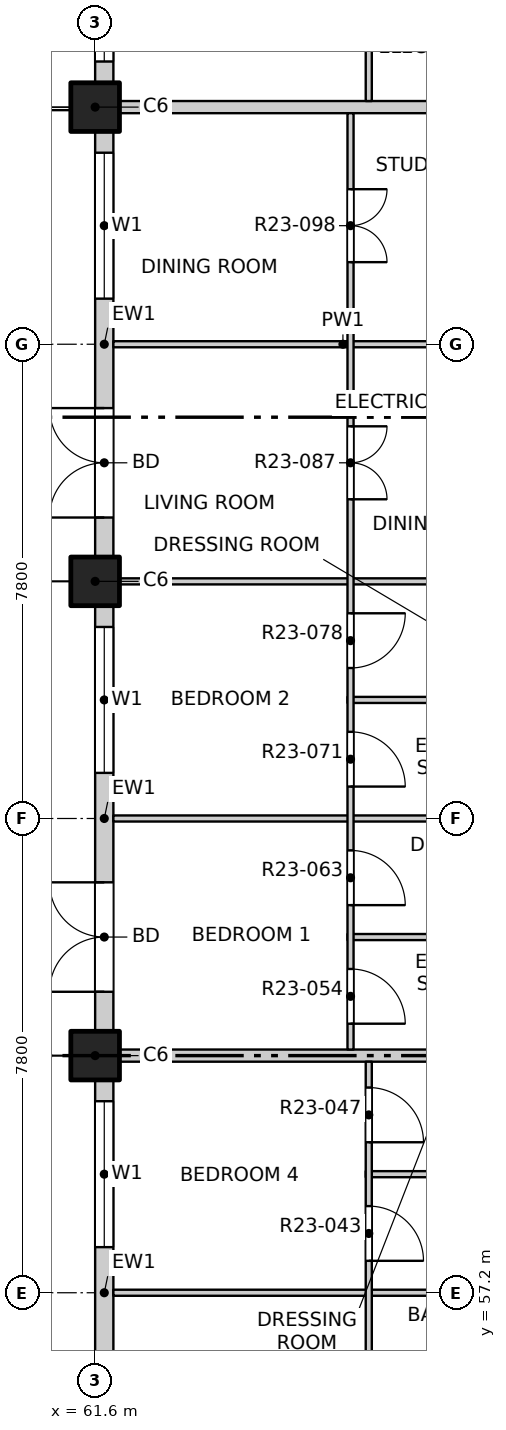
"""IFC4 building model, lengths in metres.
Left out: names, types, materials, properties, quantities, classifications, styles, units other than length and angle.
Written with IfcOpenShell. Run it as: python <this file> out.ifc"""

import sys

from ifc_helpers import new_model, si_unit, direction, frame, frame_2d, origin, origin_2d, place, context, subcontext, project, spatial, rectangle, extrude, element, fill, save


model = new_model("IFC4")
c1 = context("Model", 3, precision=1e-05, world=origin(), true_north=direction((0.0, 1.0)))
c2 = subcontext(c1, "Body", "Model", "MODEL_VIEW")
j1 = project(units=[si_unit("LENGTHUNIT", "METRE"), si_unit("PLANEANGLEUNIT", "RADIAN")], contexts=[c1])
p1 = place(None, origin())
s1 = spatial("IfcSite", under=j1, at=p1, CompositionType="ELEMENT")
p2 = place(p1, origin())
s2 = spatial("IfcBuilding", under=s1, at=p2, CompositionType="ELEMENT")
p3 = place(p2, frame((0.0, 0.0, 234.7)))
s3 = spatial("IfcBuildingStorey", under=s2, at=p3, CompositionType="ELEMENT", Elevation=234.7)
for number, where, z_axis, x_axis in (
    (1, (61.6, 61.1, -0.25), (0.0, 0.0, 1.0), (1.0, 0.0, 0.0)),
    (2, (61.6, 68.9, -0.25), (0.0, 0.0, 1.0), (1.0, 0.0, 0.0)),
    (3, (61.6, 76.7, -0.25), (0.0, 0.0, 1.0), (1.0, 0.0, 0.0)),
):
    element("IfcColumn", number, at=place(p3, frame(where, z_axis=z_axis, x_axis=x_axis)), inside=s3, PredefinedType="COLUMN", context=c2, shape_type="SweptSolid", body=[
        extrude(rectangle(XDim=0.8, YDim=0.8, at=origin_2d()), origin(), (0.0, 0.0, 1.0), 3.4),
    ])
p4 = place(p3, frame((61.75, 53.7, 0.0), z_axis=(0.0, 0.0, 1.0), x_axis=(0.0, 1.0, 0.0)))
e4 = element("IfcWall", 4, at=p4, inside=s3, PredefinedType="SOLIDWALL", context=c2, shape_type="SweptSolid", body=[
    extrude(rectangle(XDim=7.0, YDim=0.3, at=frame_2d((3.5, 0.0))), origin(), (0.0, 0.0, 1.0), 2.7),
])
p5 = place(p4, frame((0.65, 0.0, 0.0)))
e5 = element("IfcOpeningElement", 5, at=p5, cuts=e4, PredefinedType="OPENING", context=c2, shape_type="SweptSolid", body=[
    extrude(rectangle(XDim=1.8, YDim=2.4, at=frame_2d((0.9, 1.2))), frame((0.0, 0.16, 0.0), z_axis=(0.0, -1.0, 0.0), x_axis=(1.0, 0.0, 0.0)), (0.0, 0.0, 1.0), 0.32),
])
p6 = place(p4, frame((4.25, 0.0, 0.9)))
e6 = element("IfcOpeningElement", 6, at=p6, cuts=e4, PredefinedType="OPENING", context=c2, shape_type="SweptSolid", body=[
    extrude(rectangle(XDim=2.4, YDim=1.8, at=frame_2d((1.2, 0.9))), frame((0.0, 0.16, 0.0), z_axis=(0.0, -1.0, 0.0), x_axis=(1.0, 0.0, 0.0)), (0.0, 0.0, 1.0), 0.32),
])
p7 = place(p3, frame((61.75, 61.5, 0.0), z_axis=(0.0, 0.0, 1.0), x_axis=(0.0, 1.0, 0.0)))
e7 = element("IfcWall", 7, at=p7, inside=s3, PredefinedType="SOLIDWALL", context=c2, shape_type="SweptSolid", body=[
    extrude(rectangle(XDim=7.0, YDim=0.3, at=frame_2d((3.5, 0.0))), origin(), (0.0, 0.0, 1.0), 2.7),
])
p8 = place(p7, frame((0.65, 0.0, 0.0)))
e8 = element("IfcOpeningElement", 8, at=p8, cuts=e7, PredefinedType="OPENING", context=c2, shape_type="SweptSolid", body=[
    extrude(rectangle(XDim=1.8, YDim=2.4, at=frame_2d((0.9, 1.2))), frame((0.0, 0.16, 0.0), z_axis=(0.0, -1.0, 0.0), x_axis=(1.0, 0.0, 0.0)), (0.0, 0.0, 1.0), 0.32),
])
p9 = place(p7, frame((4.25, 0.0, 0.9)))
e9 = element("IfcOpeningElement", 9, at=p9, cuts=e7, PredefinedType="OPENING", context=c2, shape_type="SweptSolid", body=[
    extrude(rectangle(XDim=2.4, YDim=1.8, at=frame_2d((1.2, 0.9))), frame((0.0, 0.16, 0.0), z_axis=(0.0, -1.0, 0.0), x_axis=(1.0, 0.0, 0.0)), (0.0, 0.0, 1.0), 0.32),
])
p10 = place(p3, frame((61.75, 69.3, 0.0), z_axis=(0.0, 0.0, 1.0), x_axis=(0.0, 1.0, 0.0)))
e10 = element("IfcWall", 10, at=p10, inside=s3, PredefinedType="SOLIDWALL", context=c2, shape_type="SweptSolid", body=[
    extrude(rectangle(XDim=7.0, YDim=0.3, at=frame_2d((3.5, 0.0))), origin(), (0.0, 0.0, 1.0), 2.7),
])
p11 = place(p10, frame((0.65, 0.0, 0.0)))
e11 = element("IfcOpeningElement", 11, at=p11, cuts=e10, PredefinedType="OPENING", context=c2, shape_type="SweptSolid", body=[
    extrude(rectangle(XDim=1.8, YDim=2.4, at=frame_2d((0.9, 1.2))), frame((0.0, 0.16, 0.0), z_axis=(0.0, -1.0, 0.0), x_axis=(1.0, 0.0, 0.0)), (0.0, 0.0, 1.0), 0.32),
])
p12 = place(p10, frame((4.25, 0.0, 0.9)))
e12 = element("IfcOpeningElement", 12, at=p12, cuts=e10, PredefinedType="OPENING", context=c2, shape_type="SweptSolid", body=[
    extrude(rectangle(XDim=2.4, YDim=1.8, at=frame_2d((1.2, 0.9))), frame((0.0, 0.16, 0.0), z_axis=(0.0, -1.0, 0.0), x_axis=(1.0, 0.0, 0.0)), (0.0, 0.0, 1.0), 0.32),
])
p13 = place(p3, frame((61.75, 77.1, 0.0), z_axis=(0.0, 0.0, 1.0), x_axis=(0.0, 1.0, 0.0)))
e13 = element("IfcWall", 13, at=p13, inside=s3, PredefinedType="SOLIDWALL", context=c2, shape_type="SweptSolid", body=[
    extrude(rectangle(XDim=7.4, YDim=0.3, at=frame_2d((3.7, 0.0))), origin(), (0.0, 0.0, 1.0), 2.7),
])
p14 = place(p13, frame((0.35, 0.0, 0.9)))
e14 = element("IfcOpeningElement", 14, at=p14, cuts=e13, PredefinedType="OPENING", context=c2, shape_type="SweptSolid", body=[
    extrude(rectangle(XDim=2.4, YDim=1.8, at=frame_2d((1.2, 0.9))), frame((0.0, 0.16, 0.0), z_axis=(0.0, -1.0, 0.0), x_axis=(1.0, 0.0, 0.0)), (0.0, 0.0, 1.0), 0.32),
])
p15 = place(p13, frame((4.25, 0.0, 0.9)))
e15 = element("IfcOpeningElement", 15, at=p15, cuts=e13, PredefinedType="OPENING", context=c2, shape_type="SweptSolid", body=[
    extrude(rectangle(XDim=2.4, YDim=1.8, at=frame_2d((1.2, 0.9))), frame((0.0, 0.16, 0.0), z_axis=(0.0, -1.0, 0.0), x_axis=(1.0, 0.0, 0.0)), (0.0, 0.0, 1.0), 0.32),
])
p16 = place(p3, frame((61.9, 57.2, 0.0), z_axis=(0.0, 0.0, 1.0), x_axis=(1.0, 0.0, 0.0)))
e16 = element("IfcWall", 16, at=p16, inside=s3, PredefinedType="PARTITIONING", context=c2, shape_type="SweptSolid", body=[
    extrude(rectangle(XDim=7.55, YDim=0.1, at=frame_2d((3.775, 0.0))), origin(), (0.0, 0.0, 1.0), 3.15),
])
p17 = place(p3, frame((66.05, 59.15, 0.0), z_axis=(0.0, 0.0, 1.0), x_axis=(1.0, 0.0, 0.0)))
e17 = element("IfcWall", 17, at=p17, inside=s3, PredefinedType="PARTITIONING", context=c2, shape_type="SweptSolid", body=[
    extrude(rectangle(XDim=3.4, YDim=0.1, at=frame_2d((1.7, 0.0))), origin(), (0.0, 0.0, 1.0), 3.15),
])
p18 = place(p3, frame((61.9, 61.1, 0.0), z_axis=(0.0, 0.0, 1.0), x_axis=(1.0, 0.0, 0.0)))
e18 = element("IfcWall", 18, at=p18, inside=s3, PredefinedType="PARTITIONING", context=c2, shape_type="SweptSolid", body=[
    extrude(rectangle(XDim=11.5, YDim=0.2, at=frame_2d((5.75, 0.0))), origin(), (0.0, 0.0, 1.0), 2.55),
])
p19 = place(p3, frame((65.75, 63.05, 0.0), z_axis=(0.0, 0.0, 1.0), x_axis=(1.0, 0.0, 0.0)))
e19 = element("IfcWall", 19, at=p19, inside=s3, PredefinedType="PARTITIONING", context=c2, shape_type="SweptSolid", body=[
    extrude(rectangle(XDim=3.7, YDim=0.1, at=frame_2d((1.85, 0.0))), origin(), (0.0, 0.0, 1.0), 3.15),
])
p20 = place(p3, frame((61.9, 65.0, 0.0), z_axis=(0.0, 0.0, 1.0), x_axis=(1.0, 0.0, 0.0)))
e20 = element("IfcWall", 20, at=p20, inside=s3, PredefinedType="PARTITIONING", context=c2, shape_type="SweptSolid", body=[
    extrude(rectangle(XDim=7.55, YDim=0.1, at=frame_2d((3.775, 0.0))), origin(), (0.0, 0.0, 1.0), 3.15),
])
p21 = place(p3, frame((65.75, 66.95, 0.0), z_axis=(0.0, 0.0, 1.0), x_axis=(1.0, 0.0, 0.0)))
e21 = element("IfcWall", 21, at=p21, inside=s3, PredefinedType="PARTITIONING", context=c2, shape_type="SweptSolid", body=[
    extrude(rectangle(XDim=3.7, YDim=0.1, at=frame_2d((1.85, 0.0))), origin(), (0.0, 0.0, 1.0), 3.15),
])
p22 = place(p3, frame((61.9, 68.9, 0.0), z_axis=(0.0, 0.0, 1.0), x_axis=(1.0, 0.0, 0.0)))
e22 = element("IfcWall", 22, at=p22, inside=s3, PredefinedType="PARTITIONING", context=c2, shape_type="SweptSolid", body=[
    extrude(rectangle(XDim=7.55, YDim=0.1, at=frame_2d((3.775, 0.0))), origin(), (0.0, 0.0, 1.0), 2.55),
])
p23 = place(p3, frame((61.9, 72.8, 0.0), z_axis=(0.0, 0.0, 1.0), x_axis=(1.0, 0.0, 0.0)))
e23 = element("IfcWall", 23, at=p23, inside=s3, PredefinedType="PARTITIONING", context=c2, shape_type="SweptSolid", body=[
    extrude(rectangle(XDim=7.55, YDim=0.1, at=frame_2d((3.775, 0.0))), origin(), (0.0, 0.0, 1.0), 3.15),
])
p24 = place(p3, frame((61.9, 76.7, 0.0), z_axis=(0.0, 0.0, 1.0), x_axis=(1.0, 0.0, 0.0)))
e24 = element("IfcWall", 24, at=p24, inside=s3, PredefinedType="PARTITIONING", context=c2, shape_type="SweptSolid", body=[
    extrude(rectangle(XDim=11.5, YDim=0.2, at=frame_2d((5.75, 0.0))), origin(), (0.0, 0.0, 1.0), 2.55),
])
p25 = place(p3, frame((65.8, 61.2, 0.0), z_axis=(0.0, 0.0, 1.0), x_axis=(0.0, 1.0, 0.0)))
e25 = element("IfcWall", 25, at=p25, inside=s3, PredefinedType="PARTITIONING", context=c2, shape_type="SweptSolid", body=[
    extrude(rectangle(XDim=15.4, YDim=0.1, at=frame_2d((7.7, 0.0))), origin(), (0.0, 0.0, 1.0), 3.15),
])
p26 = place(p25, frame((0.425, 0.0, 0.0)))
e26 = element("IfcOpeningElement", 26, at=p26, cuts=e25, PredefinedType="OPENING", context=c2, shape_type="SweptSolid", body=[
    extrude(rectangle(XDim=0.9, YDim=2.1, at=frame_2d((0.45, 1.05))), frame((0.0, 0.06, 0.0), z_axis=(0.0, -1.0, 0.0), x_axis=(1.0, 0.0, 0.0)), (0.0, 0.0, 1.0), 0.12),
])
p27 = place(p25, frame((2.375, 0.0, 0.0)))
e27 = element("IfcOpeningElement", 27, at=p27, cuts=e25, PredefinedType="OPENING", context=c2, shape_type="SweptSolid", body=[
    extrude(rectangle(XDim=0.9, YDim=2.1, at=frame_2d((0.45, 1.05))), frame((0.0, 0.06, 0.0), z_axis=(0.0, -1.0, 0.0), x_axis=(1.0, 0.0, 0.0)), (0.0, 0.0, 1.0), 0.12),
])
p28 = place(p25, frame((4.325, 0.0, 0.0)))
e28 = element("IfcOpeningElement", 28, at=p28, cuts=e25, PredefinedType="OPENING", context=c2, shape_type="SweptSolid", body=[
    extrude(rectangle(XDim=0.9, YDim=2.1, at=frame_2d((0.45, 1.05))), frame((0.0, 0.06, 0.0), z_axis=(0.0, -1.0, 0.0), x_axis=(1.0, 0.0, 0.0)), (0.0, 0.0, 1.0), 0.12),
])
p29 = place(p25, frame((6.275, 0.0, 0.0)))
e29 = element("IfcOpeningElement", 29, at=p29, cuts=e25, PredefinedType="OPENING", context=c2, shape_type="SweptSolid", body=[
    extrude(rectangle(XDim=0.9, YDim=2.1, at=frame_2d((0.45, 1.05))), frame((0.0, 0.06, 0.0), z_axis=(0.0, -1.0, 0.0), x_axis=(1.0, 0.0, 0.0)), (0.0, 0.0, 1.0), 0.12),
])
p30 = place(p25, frame((9.05, 0.0, 0.0)))
e30 = element("IfcOpeningElement", 30, at=p30, cuts=e25, PredefinedType="OPENING", context=c2, shape_type="SweptSolid", body=[
    extrude(rectangle(XDim=1.2, YDim=2.1, at=frame_2d((0.6, 1.05))), frame((0.0, 0.06, 0.0), z_axis=(0.0, -1.0, 0.0), x_axis=(1.0, 0.0, 0.0)), (0.0, 0.0, 1.0), 0.12),
])
p31 = place(p25, frame((12.95, 0.0, 0.0)))
e31 = element("IfcOpeningElement", 31, at=p31, cuts=e25, PredefinedType="OPENING", context=c2, shape_type="SweptSolid", body=[
    extrude(rectangle(XDim=1.2, YDim=2.1, at=frame_2d((0.6, 1.05))), frame((0.0, 0.06, 0.0), z_axis=(0.0, -1.0, 0.0), x_axis=(1.0, 0.0, 0.0)), (0.0, 0.0, 1.0), 0.12),
])
p32 = place(p3, frame((66.1, 41.9, 0.0), z_axis=(0.0, 0.0, 1.0), x_axis=(0.0, 1.0, 0.0)))
e32 = element("IfcWall", 32, at=p32, inside=s3, PredefinedType="PARTITIONING", context=c2, shape_type="SweptSolid", body=[
    extrude(rectangle(XDim=19.1, YDim=0.1, at=frame_2d((9.55, 0.0))), origin(), (0.0, 0.0, 1.0), 3.15),
])
p33 = place(p32, frame((1.05, 0.0, 0.0)))
e33 = element("IfcOpeningElement", 33, at=p33, cuts=e32, PredefinedType="OPENING", context=c2, shape_type="SweptSolid", body=[
    extrude(rectangle(XDim=1.2, YDim=2.1, at=frame_2d((0.6, 1.05))), frame((0.0, 0.06, 0.0), z_axis=(0.0, -1.0, 0.0), x_axis=(1.0, 0.0, 0.0)), (0.0, 0.0, 1.0), 0.12),
])
p34 = place(p32, frame((4.125, 0.0, 0.0)))
e34 = element("IfcOpeningElement", 34, at=p34, cuts=e32, PredefinedType="OPENING", context=c2, shape_type="SweptSolid", body=[
    extrude(rectangle(XDim=0.9, YDim=2.1, at=frame_2d((0.45, 1.05))), frame((0.0, 0.06, 0.0), z_axis=(0.0, -1.0, 0.0), x_axis=(1.0, 0.0, 0.0)), (0.0, 0.0, 1.0), 0.12),
])
p35 = place(p32, frame((6.075, 0.0, 0.0)))
e35 = element("IfcOpeningElement", 35, at=p35, cuts=e32, PredefinedType="OPENING", context=c2, shape_type="SweptSolid", body=[
    extrude(rectangle(XDim=0.9, YDim=2.1, at=frame_2d((0.45, 1.05))), frame((0.0, 0.06, 0.0), z_axis=(0.0, -1.0, 0.0), x_axis=(1.0, 0.0, 0.0)), (0.0, 0.0, 1.0), 0.12),
])
p36 = place(p32, frame((8.025, 0.0, 0.0)))
e36 = element("IfcOpeningElement", 36, at=p36, cuts=e32, PredefinedType="OPENING", context=c2, shape_type="SweptSolid", body=[
    extrude(rectangle(XDim=0.9, YDim=2.1, at=frame_2d((0.45, 1.05))), frame((0.0, 0.06, 0.0), z_axis=(0.0, -1.0, 0.0), x_axis=(1.0, 0.0, 0.0)), (0.0, 0.0, 1.0), 0.12),
])
p37 = place(p32, frame((9.975, 0.0, 0.0)))
e37 = element("IfcOpeningElement", 37, at=p37, cuts=e32, PredefinedType="OPENING", context=c2, shape_type="SweptSolid", body=[
    extrude(rectangle(XDim=0.9, YDim=2.1, at=frame_2d((0.45, 1.05))), frame((0.0, 0.06, 0.0), z_axis=(0.0, -1.0, 0.0), x_axis=(1.0, 0.0, 0.0)), (0.0, 0.0, 1.0), 0.12),
])
p38 = place(p32, frame((12.75, 0.0, 0.0)))
e38 = element("IfcOpeningElement", 38, at=p38, cuts=e32, PredefinedType="OPENING", context=c2, shape_type="SweptSolid", body=[
    extrude(rectangle(XDim=1.2, YDim=2.1, at=frame_2d((0.6, 1.05))), frame((0.0, 0.06, 0.0), z_axis=(0.0, -1.0, 0.0), x_axis=(1.0, 0.0, 0.0)), (0.0, 0.0, 1.0), 0.12),
])
p39 = place(p32, frame((15.825, 0.0, 0.0)))
e39 = element("IfcOpeningElement", 39, at=p39, cuts=e32, PredefinedType="OPENING", context=c2, shape_type="SweptSolid", body=[
    extrude(rectangle(XDim=0.9, YDim=2.1, at=frame_2d((0.45, 1.05))), frame((0.0, 0.06, 0.0), z_axis=(0.0, -1.0, 0.0), x_axis=(1.0, 0.0, 0.0)), (0.0, 0.0, 1.0), 0.12),
])
p40 = place(p32, frame((17.775, 0.0, 0.0)))
e40 = element("IfcOpeningElement", 40, at=p40, cuts=e32, PredefinedType="OPENING", context=c2, shape_type="SweptSolid", body=[
    extrude(rectangle(XDim=0.9, YDim=2.1, at=frame_2d((0.45, 1.05))), frame((0.0, 0.06, 0.0), z_axis=(0.0, -1.0, 0.0), x_axis=(1.0, 0.0, 0.0)), (0.0, 0.0, 1.0), 0.12),
])
p41 = place(p3, frame((66.1, 76.8, 0.0), z_axis=(0.0, 0.0, 1.0), x_axis=(0.0, 1.0, 0.0)))
e41 = element("IfcWall", 41, at=p41, inside=s3, PredefinedType="PARTITIONING", context=c2, shape_type="SweptSolid", body=[
    extrude(rectangle(XDim=11.3, YDim=0.1, at=frame_2d((5.65, 0.0))), origin(), (0.0, 0.0, 1.0), 3.15),
])
p42 = place(p41, frame((1.25, 0.0, 0.0)))
e42 = element("IfcOpeningElement", 42, at=p42, cuts=e41, PredefinedType="OPENING", context=c2, shape_type="SweptSolid", body=[
    extrude(rectangle(XDim=1.2, YDim=2.1, at=frame_2d((0.6, 1.05))), frame((0.0, 0.06, 0.0), z_axis=(0.0, -1.0, 0.0), x_axis=(1.0, 0.0, 0.0)), (0.0, 0.0, 1.0), 0.12),
])
p43 = place(p41, frame((5.15, 0.0, 0.0)))
e43 = element("IfcOpeningElement", 43, at=p43, cuts=e41, PredefinedType="OPENING", context=c2, shape_type="SweptSolid", body=[
    extrude(rectangle(XDim=1.2, YDim=2.1, at=frame_2d((0.6, 1.05))), frame((0.0, 0.06, 0.0), z_axis=(0.0, -1.0, 0.0), x_axis=(1.0, 0.0, 0.0)), (0.0, 0.0, 1.0), 0.12),
])
p44 = place(p41, frame((9.05, 0.0, 0.0)))
e44 = element("IfcOpeningElement", 44, at=p44, cuts=e41, PredefinedType="OPENING", context=c2, shape_type="SweptSolid", body=[
    extrude(rectangle(XDim=1.2, YDim=2.1, at=frame_2d((0.6, 1.05))), frame((0.0, 0.06, 0.0), z_axis=(0.0, -1.0, 0.0), x_axis=(1.0, 0.0, 0.0)), (0.0, 0.0, 1.0), 0.12),
])
p45 = place(p6, origin())
e45 = element("IfcWindow", 45, at=p45, inside=s3, PartitioningType="DOUBLE_PANEL_VERTICAL", PredefinedType="WINDOW", context=c2, shape_type="SweptSolid", body=[
    extrude(rectangle(XDim=2.4, YDim=1.8, at=frame_2d((1.2, 0.9))), frame((0.0, 0.03, 0.0), z_axis=(0.0, -1.0, 0.0), x_axis=(1.0, 0.0, 0.0)), (0.0, 0.0, 1.0), 0.06),
])
fill(e6, e45)
p46 = place(p8, origin())
e46 = element("IfcDoor", 46, at=p46, inside=s3, OperationType="DOUBLE_DOOR_SINGLE_SWING", PredefinedType="DOOR", context=c2, shape_type="SweptSolid", body=[
    extrude(rectangle(XDim=1.8, YDim=2.4, at=frame_2d((0.9, 1.2))), frame((0.0, 0.025, 0.0), z_axis=(0.0, -1.0, 0.0), x_axis=(1.0, 0.0, 0.0)), (0.0, 0.0, 1.0), 0.05),
])
fill(e8, e46)
p47 = place(p9, origin())
e47 = element("IfcWindow", 47, at=p47, inside=s3, PartitioningType="DOUBLE_PANEL_VERTICAL", PredefinedType="WINDOW", context=c2, shape_type="SweptSolid", body=[
    extrude(rectangle(XDim=2.4, YDim=1.8, at=frame_2d((1.2, 0.9))), frame((0.0, 0.03, 0.0), z_axis=(0.0, -1.0, 0.0), x_axis=(1.0, 0.0, 0.0)), (0.0, 0.0, 1.0), 0.06),
])
fill(e9, e47)
p48 = place(p11, origin())
e48 = element("IfcDoor", 48, at=p48, inside=s3, OperationType="DOUBLE_DOOR_SINGLE_SWING", PredefinedType="DOOR", context=c2, shape_type="SweptSolid", body=[
    extrude(rectangle(XDim=1.8, YDim=2.4, at=frame_2d((0.9, 1.2))), frame((0.0, 0.025, 0.0), z_axis=(0.0, -1.0, 0.0), x_axis=(1.0, 0.0, 0.0)), (0.0, 0.0, 1.0), 0.05),
])
fill(e11, e48)
p49 = place(p12, origin())
e49 = element("IfcWindow", 49, at=p49, inside=s3, PartitioningType="DOUBLE_PANEL_VERTICAL", PredefinedType="WINDOW", context=c2, shape_type="SweptSolid", body=[
    extrude(rectangle(XDim=2.4, YDim=1.8, at=frame_2d((1.2, 0.9))), frame((0.0, 0.03, 0.0), z_axis=(0.0, -1.0, 0.0), x_axis=(1.0, 0.0, 0.0)), (0.0, 0.0, 1.0), 0.06),
])
fill(e12, e49)
p50 = place(p14, origin())
e50 = element("IfcWindow", 50, at=p50, inside=s3, PartitioningType="DOUBLE_PANEL_VERTICAL", PredefinedType="WINDOW", context=c2, shape_type="SweptSolid", body=[
    extrude(rectangle(XDim=2.4, YDim=1.8, at=frame_2d((1.2, 0.9))), frame((0.0, 0.03, 0.0), z_axis=(0.0, -1.0, 0.0), x_axis=(1.0, 0.0, 0.0)), (0.0, 0.0, 1.0), 0.06),
])
fill(e14, e50)
p51 = place(p39, origin())
e51 = element("IfcDoor", 51, at=p51, inside=s3, OperationType="SINGLE_SWING_RIGHT", PredefinedType="DOOR", context=c2, shape_type="SweptSolid", body=[
    extrude(rectangle(XDim=0.9, YDim=2.1, at=frame_2d((0.45, 1.05))), frame((0.0, 0.025, 0.0), z_axis=(0.0, -1.0, 0.0), x_axis=(1.0, 0.0, 0.0)), (0.0, 0.0, 1.0), 0.05),
])
fill(e39, e51)
p52 = place(p40, origin())
e52 = element("IfcDoor", 52, at=p52, inside=s3, OperationType="SINGLE_SWING_RIGHT", PredefinedType="DOOR", context=c2, shape_type="SweptSolid", body=[
    extrude(rectangle(XDim=0.9, YDim=2.1, at=frame_2d((0.45, 1.05))), frame((0.0, 0.025, 0.0), z_axis=(0.0, -1.0, 0.0), x_axis=(1.0, 0.0, 0.0)), (0.0, 0.0, 1.0), 0.05),
])
fill(e40, e52)
p53 = place(p26, origin())
e53 = element("IfcDoor", 53, at=p53, inside=s3, OperationType="SINGLE_SWING_RIGHT", PredefinedType="DOOR", context=c2, shape_type="SweptSolid", body=[
    extrude(rectangle(XDim=0.9, YDim=2.1, at=frame_2d((0.45, 1.05))), frame((0.0, 0.025, 0.0), z_axis=(0.0, -1.0, 0.0), x_axis=(1.0, 0.0, 0.0)), (0.0, 0.0, 1.0), 0.05),
])
fill(e26, e53)
p54 = place(p27, origin())
e54 = element("IfcDoor", 54, at=p54, inside=s3, OperationType="SINGLE_SWING_RIGHT", PredefinedType="DOOR", context=c2, shape_type="SweptSolid", body=[
    extrude(rectangle(XDim=0.9, YDim=2.1, at=frame_2d((0.45, 1.05))), frame((0.0, 0.025, 0.0), z_axis=(0.0, -1.0, 0.0), x_axis=(1.0, 0.0, 0.0)), (0.0, 0.0, 1.0), 0.05),
])
fill(e27, e54)
p55 = place(p28, origin())
e55 = element("IfcDoor", 55, at=p55, inside=s3, OperationType="SINGLE_SWING_RIGHT", PredefinedType="DOOR", context=c2, shape_type="SweptSolid", body=[
    extrude(rectangle(XDim=0.9, YDim=2.1, at=frame_2d((0.45, 1.05))), frame((0.0, 0.025, 0.0), z_axis=(0.0, -1.0, 0.0), x_axis=(1.0, 0.0, 0.0)), (0.0, 0.0, 1.0), 0.05),
])
fill(e28, e55)
p56 = place(p29, origin())
e56 = element("IfcDoor", 56, at=p56, inside=s3, OperationType="SINGLE_SWING_LEFT", PredefinedType="DOOR", context=c2, shape_type="SweptSolid", body=[
    extrude(rectangle(XDim=0.9, YDim=2.1, at=frame_2d((0.45, 1.05))), frame((0.0, 0.025, 0.0), z_axis=(0.0, -1.0, 0.0), x_axis=(1.0, 0.0, 0.0)), (0.0, 0.0, 1.0), 0.05),
])
fill(e29, e56)
p57 = place(p30, origin())
e57 = element("IfcDoor", 57, at=p57, inside=s3, OperationType="DOUBLE_DOOR_SINGLE_SWING", PredefinedType="DOOR", context=c2, shape_type="SweptSolid", body=[
    extrude(rectangle(XDim=1.2, YDim=2.1, at=frame_2d((0.6, 1.05))), frame((0.0, 0.025, 0.0), z_axis=(0.0, -1.0, 0.0), x_axis=(1.0, 0.0, 0.0)), (0.0, 0.0, 1.0), 0.05),
])
fill(e30, e57)
p58 = place(p31, origin())
e58 = element("IfcDoor", 58, at=p58, inside=s3, OperationType="DOUBLE_DOOR_SINGLE_SWING", PredefinedType="DOOR", context=c2, shape_type="SweptSolid", body=[
    extrude(rectangle(XDim=1.2, YDim=2.1, at=frame_2d((0.6, 1.05))), frame((0.0, 0.025, 0.0), z_axis=(0.0, -1.0, 0.0), x_axis=(1.0, 0.0, 0.0)), (0.0, 0.0, 1.0), 0.05),
])
fill(e31, e58)
save(model, sys.argv[1])
